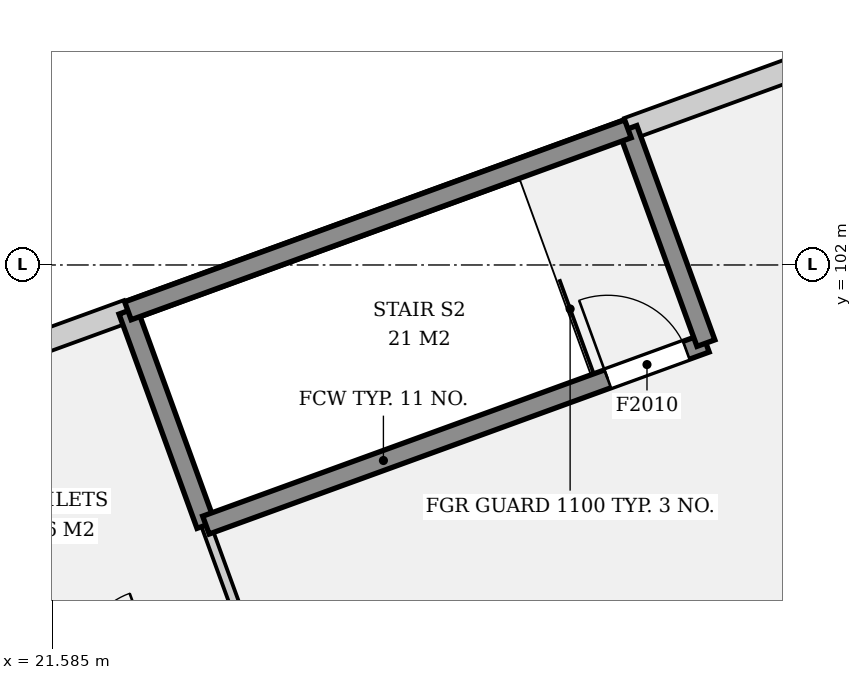
"""IFC4 building model, lengths in metres.
Left out: names, types, materials, properties, quantities, classifications, styles, units other than length and angle.
Written with IfcOpenShell. Run it as: python <this file> out.ifc"""

import sys

from ifc_helpers import new_model, si_unit, direction, frame, frame_2d, origin, place, context, subcontext, project, spatial, rectangle, extrude, element, fill, save


model = new_model("IFC4")
c1 = context("Model", 3, precision=1e-05, world=origin(), true_north=direction((0.0, 1.0)))
c2 = subcontext(c1, "Body", "Model", "MODEL_VIEW")
j1 = project(units=[si_unit("LENGTHUNIT", "METRE"), si_unit("PLANEANGLEUNIT", "RADIAN")], contexts=[c1])
p1 = place(None, origin())
s1 = spatial("IfcSite", under=j1, at=p1, CompositionType="ELEMENT")
p2 = place(p1, origin())
s2 = spatial("IfcBuilding", under=s1, at=p2, CompositionType="ELEMENT")
p3 = place(p2, frame((0.0, 0.0, 9.4)))
s3 = spatial("IfcBuildingStorey", under=s2, at=p3, CompositionType="ELEMENT", Elevation=9.4)
p4 = place(p3, frame((23.606, 98.578, 0.0), z_axis=(0.0, 0.0, 1.0), x_axis=(-0.342037080957, 0.939686455819, 0.0)))
e1 = element("IfcWall", 1, at=p4, inside=s3, PredefinedType="SOLIDWALL", context=c2, shape_type="SweptSolid", body=[
    extrude(rectangle(XDim=3.0, YDim=0.25, at=frame_2d((1.5, 0.0))), origin(), (0.0, 0.0, 1.0), 4.4),
])
p5 = place(p3, frame((23.606, 98.578, 0.0), z_axis=(0.0, 0.0, 1.0), x_axis=(0.939693585395, 0.342017493073, 0.0)))
e2 = element("IfcWall", 2, at=p5, inside=s3, PredefinedType="SOLIDWALL", context=c2, shape_type="SweptSolid", body=[
    extrude(rectangle(XDim=7.0, YDim=0.25, at=frame_2d((3.5, 0.0))), origin(), (0.0, 0.0, 1.0), 4.4),
])
p6 = place(p5, frame((5.625, 0.0, 0.0)))
e3 = element("IfcOpeningElement", 3, at=p6, cuts=e2, PredefinedType="OPENING", context=c2, shape_type="SweptSolid", body=[
    extrude(rectangle(XDim=1.1, YDim=2.1, at=frame_2d((0.55, 1.05))), frame((0.0, 0.135, 0.0), z_axis=(0.0, -1.0, 0.0), x_axis=(1.0, 0.0, 0.0)), (0.0, 0.0, 1.0), 0.27),
])
p7 = place(p3, frame((30.184, 100.972, 0.0), z_axis=(0.0, 0.0, 1.0), x_axis=(-0.341965219194, 0.939712609717, 0.0)))
e4 = element("IfcWall", 4, at=p7, inside=s3, PredefinedType="SOLIDWALL", context=c2, shape_type="SweptSolid", body=[
    extrude(rectangle(XDim=3.0, YDim=0.25, at=frame_2d((1.5, 0.0))), origin(), (0.0, 0.0, 1.0), 4.4),
])
p8 = place(p3, frame((29.158, 103.791, 0.0), z_axis=(0.0, 0.0, 1.0), x_axis=(-0.939697665127, -0.342006283793, 0.0)))
e5 = element("IfcWall", 5, at=p8, inside=s3, PredefinedType="SOLIDWALL", context=c2, shape_type="SweptSolid", body=[
    extrude(rectangle(XDim=7.0, YDim=0.25, at=frame_2d((3.5, 0.0))), origin(), (0.0, 0.0, 1.0), 4.4),
])
p9 = place(p3, frame((31.507, 104.646, 0.0), z_axis=(0.0, 0.0, 1.0), x_axis=(-0.939696437289, -0.342009657388, 0.0)))
e6 = element("IfcWall", 6, at=p9, inside=s3, PredefinedType="ELEMENTEDWALL", context=c2, shape_type="SweptSolid", body=[
    extrude(rectangle(XDim=2.5, YDim=0.3, at=frame_2d((1.25, 0.0))), origin(), (0.0, 0.0, 1.0), 4.4),
])
p10 = place(p3, frame((22.58, 101.397, 0.0), z_axis=(0.0, 0.0, 1.0), x_axis=(-0.939693585395, -0.342017493073, 0.0)))
e7 = element("IfcWall", 7, at=p10, inside=s3, PredefinedType="ELEMENTEDWALL", context=c2, shape_type="SweptSolid", body=[
    extrude(rectangle(XDim=3.5, YDim=0.3, at=frame_2d((1.75, 0.0))), origin(), (0.0, 0.0, 1.0), 4.4),
])
p11 = place(p3, frame((24.974, 94.819, 0.0), z_axis=(0.0, 0.0, 1.0), x_axis=(-0.341983185197, 0.939706071622, 0.0)))
e8 = element("IfcWall", 8, at=p11, inside=s3, PredefinedType="PARTITIONING", context=c2, shape_type="SweptSolid", body=[
    extrude(rectangle(XDim=4.0, YDim=0.125, at=frame_2d((2.0, 0.0))), origin(), (0.0, 0.0, 1.0), 4.4),
])
p12 = place(p11, frame((0.75, 0.0, 0.0)))
e9 = element("IfcOpeningElement", 9, at=p12, cuts=e8, PredefinedType="OPENING", context=c2, shape_type="SweptSolid", body=[
    extrude(rectangle(XDim=1.0, YDim=2.1, at=frame_2d((0.5, 1.05))), frame((0.0, 0.073, 0.0), z_axis=(0.0, -1.0, 0.0), x_axis=(1.0, 0.0, 0.0)), (0.0, 0.0, 1.0), 0.145),
])
p13 = place(p6, origin())
e10 = element("IfcDoor", 10, at=p13, inside=s3, OperationType="SINGLE_SWING_LEFT", PredefinedType="DOOR", context=c2, shape_type="SweptSolid", body=[
    extrude(rectangle(XDim=1.1, YDim=2.1, at=frame_2d((0.55, 1.05))), frame((0.0, 0.025, 0.0), z_axis=(0.0, -1.0, 0.0), x_axis=(1.0, 0.0, 0.0)), (0.0, 0.0, 1.0), 0.05),
])
fill(e3, e10)
save(model, sys.argv[1])
